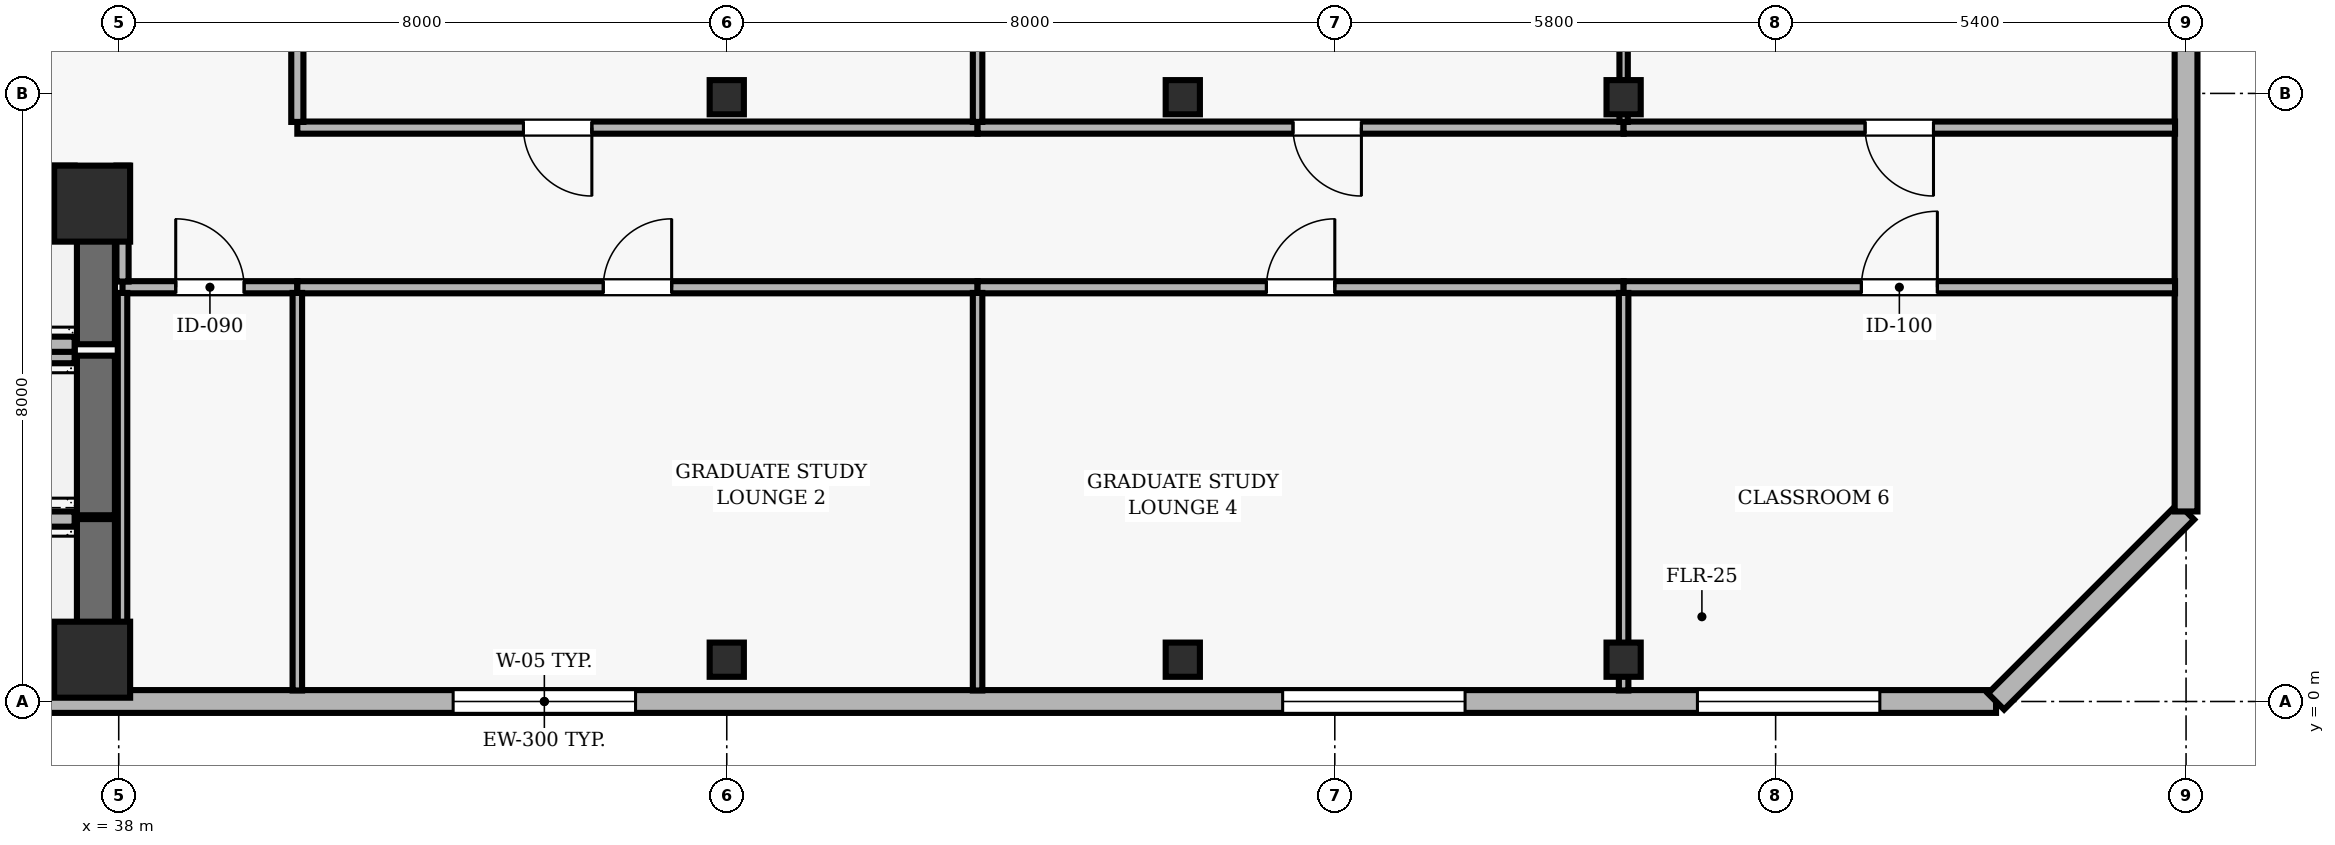
"""IFC4 building model, lengths in metres.
Left out: names, types, materials, properties, quantities, classifications, styles, units other than length and angle.
Written with IfcOpenShell. Run it as: python <this file> out.ifc"""

import sys

from ifc_helpers import new_model, si_unit, direction, frame, frame_2d, origin, origin_2d, place, context, subcontext, project, spatial, rectangle, hollow_rectangle, extrude, element, fill, save


model = new_model("IFC4")
c1 = context("Model", 3, precision=1e-05, world=origin(), true_north=direction((0.0, 1.0)))
c2 = subcontext(c1, "Body", "Model", "MODEL_VIEW")
j1 = project(units=[si_unit("LENGTHUNIT", "METRE"), si_unit("PLANEANGLEUNIT", "RADIAN")], contexts=[c1])
p1 = place(None, origin())
s1 = spatial("IfcSite", under=j1, at=p1, CompositionType="ELEMENT")
p2 = place(p1, origin())
s2 = spatial("IfcBuilding", under=s1, at=p2, CompositionType="ELEMENT")
p3 = place(p2, frame((0.0, 0.0, 214.8)))
s3 = spatial("IfcBuildingStorey", under=s2, at=p3, CompositionType="ELEMENT", Elevation=214.8)
for number, where, z_axis, x_axis in (
    (1, (37.65, 0.55, 0.0), (0.0, 0.0, 1.0), (1.0, 0.0, 0.0)),
    (2, (37.65, 6.55, 0.0), (0.0, 0.0, 1.0), (1.0, 0.0, 0.0)),
):
    element("IfcColumn", number, at=place(p3, frame(where, z_axis=z_axis, x_axis=x_axis)), inside=s3, PredefinedType="COLUMN", context=c2, shape_type="SweptSolid", body=[
        extrude(rectangle(XDim=1.0, YDim=1.0, at=origin_2d()), origin(), (0.0, 0.0, 1.0), 3.9),
    ])
for number, where, z_axis, x_axis in (
    (3, (46.0, 0.55, 0.0), (0.0, 0.0, 1.0), (1.0, 0.0, 0.0)),
    (4, (46.0, 7.95, 0.0), (0.0, 0.0, 1.0), (1.0, 0.0, 0.0)),
    (5, (52.0, 0.55, 0.0), (0.0, 0.0, 1.0), (1.0, 0.0, 0.0)),
    (6, (52.0, 7.95, 0.0), (0.0, 0.0, 1.0), (1.0, 0.0, 0.0)),
    (7, (57.8, 0.55, 0.0), (0.0, 0.0, 1.0), (1.0, 0.0, 0.0)),
    (8, (57.8, 7.95, 0.0), (0.0, 0.0, 1.0), (1.0, 0.0, 0.0)),
):
    element("IfcColumn", number, at=place(p3, frame(where, z_axis=z_axis, x_axis=x_axis)), inside=s3, PredefinedType="COLUMN", context=c2, shape_type="SweptSolid", body=[
        extrude(hollow_rectangle(XDim=0.45, YDim=0.45, WallThickness=0.02, at=origin_2d()), origin(), (0.0, 0.0, 1.0), 3.9),
    ])
p4 = place(p3, frame((24.5, 0.0, 0.0), z_axis=(0.0, 0.0, 1.0), x_axis=(1.0, 0.0, 0.0)))
e9 = element("IfcWall", 9, at=p4, inside=s3, PredefinedType="SOLIDWALL", context=c2, shape_type="SweptSolid", body=[
    extrude(rectangle(XDim=38.2, YDim=0.3, at=frame_2d((19.1, 0.0))), origin(), (0.0, 0.0, 1.0), 3.69),
])
p5 = place(p4, frame((1.529, 0.0, 0.9)))
e10 = element("IfcOpeningElement", 10, at=p5, cuts=e9, PredefinedType="OPENING", context=c2, shape_type="SweptSolid", body=[
    extrude(rectangle(XDim=2.4, YDim=1.6, at=frame_2d((1.2, 0.8))), frame((0.0, 0.16, 0.0), z_axis=(0.0, -1.0, 0.0), x_axis=(1.0, 0.0, 0.0)), (0.0, 0.0, 1.0), 0.32),
])
p6 = place(p4, frame((17.9, 0.0, 0.9)))
e11 = element("IfcOpeningElement", 11, at=p6, cuts=e9, PredefinedType="OPENING", context=c2, shape_type="SweptSolid", body=[
    extrude(rectangle(XDim=2.4, YDim=1.6, at=frame_2d((1.2, 0.8))), frame((0.0, 0.16, 0.0), z_axis=(0.0, -1.0, 0.0), x_axis=(1.0, 0.0, 0.0)), (0.0, 0.0, 1.0), 0.32),
])
p7 = place(p4, frame((28.814, 0.0, 0.9)))
e12 = element("IfcOpeningElement", 12, at=p7, cuts=e9, PredefinedType="OPENING", context=c2, shape_type="SweptSolid", body=[
    extrude(rectangle(XDim=2.4, YDim=1.6, at=frame_2d((1.2, 0.8))), frame((0.0, 0.16, 0.0), z_axis=(0.0, -1.0, 0.0), x_axis=(1.0, 0.0, 0.0)), (0.0, 0.0, 1.0), 0.32),
])
p8 = place(p4, frame((34.271, 0.0, 0.9)))
e13 = element("IfcOpeningElement", 13, at=p8, cuts=e9, PredefinedType="OPENING", context=c2, shape_type="SweptSolid", body=[
    extrude(rectangle(XDim=2.4, YDim=1.6, at=frame_2d((1.2, 0.8))), frame((0.0, 0.16, 0.0), z_axis=(0.0, -1.0, 0.0), x_axis=(1.0, 0.0, 0.0)), (0.0, 0.0, 1.0), 0.32),
])
p9 = place(p3, frame((62.7, 0.0, 0.0), z_axis=(0.0, 0.0, 1.0), x_axis=(0.707106781187, 0.707106781187, 0.0)))
e14 = element("IfcWall", 14, at=p9, inside=s3, PredefinedType="SOLIDWALL", context=c2, shape_type="SweptSolid", body=[
    extrude(rectangle(XDim=3.536, YDim=0.3, at=frame_2d((1.768, 0.0))), origin(), (0.0, 0.0, 1.0), 3.69),
])
p10 = place(p3, frame((65.2, 2.5, 0.0), z_axis=(0.0, 0.0, 1.0), x_axis=(0.0, 1.0, 0.0)))
e15 = element("IfcWall", 15, at=p10, inside=s3, PredefinedType="SOLIDWALL", context=c2, shape_type="SweptSolid", body=[
    extrude(rectangle(XDim=11.0, YDim=0.3, at=frame_2d((5.5, 0.0))), origin(), (0.0, 0.0, 1.0), 3.69),
])
p11 = place(p10, frame((7.35, 0.0, 0.9)))
e16 = element("IfcOpeningElement", 16, at=p11, cuts=e15, PredefinedType="OPENING", context=c2, shape_type="SweptSolid", body=[
    extrude(rectangle(XDim=1.8, YDim=1.8, at=frame_2d((0.9, 0.9))), frame((0.0, 0.16, 0.0), z_axis=(0.0, -1.0, 0.0), x_axis=(1.0, 0.0, 0.0)), (0.0, 0.0, 1.0), 0.32),
])
p12 = place(p3, frame((37.7, 0.3, 0.0), z_axis=(0.0, 0.0, 1.0), x_axis=(0.0, 1.0, 0.0)))
e17 = element("IfcWall", 17, at=p12, inside=s3, PredefinedType="SHEAR", context=c2, shape_type="SweptSolid", body=[
    extrude(rectangle(XDim=2.1, YDim=0.5, at=frame_2d((1.05, 0.0))), origin(), (0.0, 0.0, 1.0), 3.69),
])
for number, where, z_axis, x_axis in (
    (18, (35.28, 0.3, 0.0), (0.0, 0.0, 1.0), (1.0, 0.0, 0.0)),
    (19, (37.42, 2.4, 0.0), (0.0, 0.0, 1.0), (-1.0, 0.0, 0.0)),
):
    element("IfcWall", number, at=place(p3, frame(where, z_axis=z_axis, x_axis=x_axis)), inside=s3, PredefinedType="SOLIDWALL", context=c2, shape_type="SweptSolid", body=[
        extrude(rectangle(XDim=2.14, YDim=0.2, at=frame_2d((1.07, 0.0))), origin(), (0.0, 0.0, 1.0), 3.69),
    ])
p13 = place(p3, frame((37.7, 2.45, 0.0), z_axis=(0.0, 0.0, 1.0), x_axis=(0.0, 1.0, 0.0)))
e20 = element("IfcWall", 20, at=p13, inside=s3, PredefinedType="SHEAR", context=c2, shape_type="SweptSolid", body=[
    extrude(rectangle(XDim=2.1, YDim=0.5, at=frame_2d((1.05, 0.0))), origin(), (0.0, 0.0, 1.0), 3.69),
])
p14 = place(p3, frame((37.42, 4.55, 0.0), z_axis=(0.0, 0.0, 1.0), x_axis=(-1.0, 0.0, 0.0)))
e21 = element("IfcWall", 21, at=p14, inside=s3, PredefinedType="SOLIDWALL", context=c2, shape_type="SweptSolid", body=[
    extrude(rectangle(XDim=2.14, YDim=0.2, at=frame_2d((1.07, 0.0))), origin(), (0.0, 0.0, 1.0), 3.69),
])
p15 = place(p3, frame((37.7, 4.7, 0.0), z_axis=(0.0, 0.0, 1.0), x_axis=(0.0, 1.0, 0.0)))
e22 = element("IfcWall", 22, at=p15, inside=s3, PredefinedType="SHEAR", context=c2, shape_type="SweptSolid", body=[
    extrude(rectangle(XDim=2.25, YDim=0.5, at=frame_2d((1.125, 0.0))), origin(), (0.0, 0.0, 1.0), 3.69),
])
for number, where, z_axis, x_axis in (
    (23, (35.28, 4.7, 0.0), (0.0, 0.0, 1.0), (1.0, 0.0, 0.0)),
    (24, (37.42, 6.95, 0.0), (0.0, 0.0, 1.0), (-1.0, 0.0, 0.0)),
):
    element("IfcWall", number, at=place(p3, frame(where, z_axis=z_axis, x_axis=x_axis)), inside=s3, PredefinedType="SOLIDWALL", context=c2, shape_type="SweptSolid", body=[
        extrude(rectangle(XDim=2.14, YDim=0.2, at=frame_2d((1.07, 0.0))), origin(), (0.0, 0.0, 1.0), 3.69),
    ])
p16 = place(p3, frame((38.05, 5.45, 0.0), z_axis=(0.0, 0.0, 1.0), x_axis=(1.0, 0.0, 0.0)))
e25 = element("IfcWall", 25, at=p16, inside=s3, PredefinedType="PARTITIONING", context=c2, shape_type="SweptSolid", body=[
    extrude(rectangle(XDim=2.3, YDim=0.16, at=frame_2d((1.15, 0.0))), origin(), (0.0, 0.0, 1.0), 3.343),
])
p17 = place(p16, frame((0.7, 0.0, 0.0)))
e26 = element("IfcOpeningElement", 26, at=p17, cuts=e25, PredefinedType="OPENING", context=c2, shape_type="SweptSolid", body=[
    extrude(rectangle(XDim=0.9, YDim=2.1, at=frame_2d((0.45, 1.05))), frame((0.0, 0.09, 0.0), z_axis=(0.0, -1.0, 0.0), x_axis=(1.0, 0.0, 0.0)), (0.0, 0.0, 1.0), 0.18),
])
p18 = place(p3, frame((40.35, 5.45, 0.0), z_axis=(0.0, 0.0, 1.0), x_axis=(1.0, 0.0, 0.0)))
e27 = element("IfcWall", 27, at=p18, inside=s3, PredefinedType="PARTITIONING", context=c2, shape_type="SweptSolid", body=[
    extrude(rectangle(XDim=8.95, YDim=0.16, at=frame_2d((4.475, 0.0))), origin(), (0.0, 0.0, 1.0), 3.343),
])
p19 = place(p18, frame((4.025, 0.0, 0.0)))
e28 = element("IfcOpeningElement", 28, at=p19, cuts=e27, PredefinedType="OPENING", context=c2, shape_type="SweptSolid", body=[
    extrude(rectangle(XDim=0.9, YDim=2.1, at=frame_2d((0.45, 1.05))), frame((0.0, 0.09, 0.0), z_axis=(0.0, -1.0, 0.0), x_axis=(1.0, 0.0, 0.0)), (0.0, 0.0, 1.0), 0.18),
])
p20 = place(p3, frame((49.3, 5.45, 0.0), z_axis=(0.0, 0.0, 1.0), x_axis=(1.0, 0.0, 0.0)))
e29 = element("IfcWall", 29, at=p20, inside=s3, PredefinedType="PARTITIONING", context=c2, shape_type="SweptSolid", body=[
    extrude(rectangle(XDim=8.5, YDim=0.16, at=frame_2d((4.25, 0.0))), origin(), (0.0, 0.0, 1.0), 3.343),
])
p21 = place(p20, frame((3.8, 0.0, 0.0)))
e30 = element("IfcOpeningElement", 30, at=p21, cuts=e29, PredefinedType="OPENING", context=c2, shape_type="SweptSolid", body=[
    extrude(rectangle(XDim=0.9, YDim=2.1, at=frame_2d((0.45, 1.05))), frame((0.0, 0.09, 0.0), z_axis=(0.0, -1.0, 0.0), x_axis=(1.0, 0.0, 0.0)), (0.0, 0.0, 1.0), 0.18),
])
p22 = place(p3, frame((49.3, 7.55, 0.0), z_axis=(0.0, 0.0, 1.0), x_axis=(-1.0, 0.0, 0.0)))
e31 = element("IfcWall", 31, at=p22, inside=s3, PredefinedType="PARTITIONING", context=c2, shape_type="SweptSolid", body=[
    extrude(rectangle(XDim=8.95, YDim=0.16, at=frame_2d((4.475, 0.0))), origin(), (0.0, 0.0, 1.0), 3.139),
])
p23 = place(p22, frame((5.075, 0.0, 0.0)))
e32 = element("IfcOpeningElement", 32, at=p23, cuts=e31, PredefinedType="OPENING", context=c2, shape_type="SweptSolid", body=[
    extrude(rectangle(XDim=0.9, YDim=2.1, at=frame_2d((0.45, 1.05))), frame((0.0, 0.09, 0.0), z_axis=(0.0, -1.0, 0.0), x_axis=(1.0, 0.0, 0.0)), (0.0, 0.0, 1.0), 0.18),
])
p24 = place(p3, frame((57.8, 5.45, 0.0), z_axis=(0.0, 0.0, 1.0), x_axis=(1.0, 0.0, 0.0)))
e33 = element("IfcWall", 33, at=p24, inside=s3, PredefinedType="PARTITIONING", context=c2, shape_type="SweptSolid", body=[
    extrude(rectangle(XDim=7.255, YDim=0.16, at=frame_2d((3.627, 0.0))), origin(), (0.0, 0.0, 1.0), 3.69),
])
p25 = place(p24, frame((3.128, 0.0, 0.0)))
e34 = element("IfcOpeningElement", 34, at=p25, cuts=e33, PredefinedType="OPENING", context=c2, shape_type="SweptSolid", body=[
    extrude(rectangle(XDim=1.0, YDim=2.1, at=frame_2d((0.5, 1.05))), frame((0.0, 0.09, 0.0), z_axis=(0.0, -1.0, 0.0), x_axis=(1.0, 0.0, 0.0)), (0.0, 0.0, 1.0), 0.18),
])
p26 = place(p3, frame((57.8, 7.55, 0.0), z_axis=(0.0, 0.0, 1.0), x_axis=(-1.0, 0.0, 0.0)))
e35 = element("IfcWall", 35, at=p26, inside=s3, PredefinedType="PARTITIONING", context=c2, shape_type="SweptSolid", body=[
    extrude(rectangle(XDim=8.5, YDim=0.16, at=frame_2d((4.25, 0.0))), origin(), (0.0, 0.0, 1.0), 3.139),
])
p27 = place(p26, frame((3.45, 0.0, 0.0)))
e36 = element("IfcOpeningElement", 36, at=p27, cuts=e35, PredefinedType="OPENING", context=c2, shape_type="SweptSolid", body=[
    extrude(rectangle(XDim=0.9, YDim=2.1, at=frame_2d((0.45, 1.05))), frame((0.0, 0.09, 0.0), z_axis=(0.0, -1.0, 0.0), x_axis=(1.0, 0.0, 0.0)), (0.0, 0.0, 1.0), 0.18),
])
p28 = place(p3, frame((65.055, 7.55, 0.0), z_axis=(0.0, 0.0, 1.0), x_axis=(-1.0, 0.0, 0.0)))
e37 = element("IfcWall", 37, at=p28, inside=s3, PredefinedType="PARTITIONING", context=c2, shape_type="SweptSolid", body=[
    extrude(rectangle(XDim=7.255, YDim=0.16, at=frame_2d((3.627, 0.0))), origin(), (0.0, 0.0, 1.0), 3.69),
])
p29 = place(p28, frame((3.178, 0.0, 0.0)))
e38 = element("IfcOpeningElement", 38, at=p29, cuts=e37, PredefinedType="OPENING", context=c2, shape_type="SweptSolid", body=[
    extrude(rectangle(XDim=0.9, YDim=2.1, at=frame_2d((0.45, 1.05))), frame((0.0, 0.09, 0.0), z_axis=(0.0, -1.0, 0.0), x_axis=(1.0, 0.0, 0.0)), (0.0, 0.0, 1.0), 0.18),
])
p30 = place(p3, frame((38.05, 5.375, 0.0), z_axis=(0.0, 0.0, 1.0), x_axis=(0.0, -1.0, 0.0)))
e39 = element("IfcWall", 39, at=p30, inside=s3, PredefinedType="PARTITIONING", context=c2, shape_type="SweptSolid", body=[
    extrude(rectangle(XDim=5.23, YDim=0.125, at=frame_2d((2.615, 0.0))), origin(), (0.0, 0.0, 1.0), 3.139),
])
p31 = place(p3, frame((38.05, 7.05, 0.0), z_axis=(0.0, 0.0, 1.0), x_axis=(0.0, -1.0, 0.0)))
e40 = element("IfcWall", 40, at=p31, inside=s3, PredefinedType="PARTITIONING", context=c2, shape_type="SweptSolid", body=[
    extrude(rectangle(XDim=1.525, YDim=0.16, at=frame_2d((0.763, 0.0))), origin(), (0.0, 0.0, 1.0), 3.139),
])
p32 = place(p3, frame((40.35, 0.145, 0.0), z_axis=(0.0, 0.0, 1.0), x_axis=(0.0, 1.0, 0.0)))
e41 = element("IfcWall", 41, at=p32, inside=s3, PredefinedType="PARTITIONING", context=c2, shape_type="SweptSolid", body=[
    extrude(rectangle(XDim=5.23, YDim=0.125, at=frame_2d((2.615, 0.0))), origin(), (0.0, 0.0, 1.0), 3.69),
])
p33 = place(p3, frame((40.35, 7.625, 0.0), z_axis=(0.0, 0.0, 1.0), x_axis=(0.0, 1.0, 0.0)))
e42 = element("IfcWall", 42, at=p33, inside=s3, PredefinedType="PARTITIONING", context=c2, shape_type="SweptSolid", body=[
    extrude(rectangle(XDim=8.3, YDim=0.16, at=frame_2d((4.15, 0.0))), origin(), (0.0, 0.0, 1.0), 3.69),
])
p34 = place(p3, frame((49.3, 0.145, 0.0), z_axis=(0.0, 0.0, 1.0), x_axis=(0.0, 1.0, 0.0)))
e43 = element("IfcWall", 43, at=p34, inside=s3, PredefinedType="PARTITIONING", context=c2, shape_type="SweptSolid", body=[
    extrude(rectangle(XDim=5.23, YDim=0.125, at=frame_2d((2.615, 0.0))), origin(), (0.0, 0.0, 1.0), 3.69),
])
p35 = place(p3, frame((49.3, 7.625, 0.0), z_axis=(0.0, 0.0, 1.0), x_axis=(0.0, 1.0, 0.0)))
e44 = element("IfcWall", 44, at=p35, inside=s3, PredefinedType="PARTITIONING", context=c2, shape_type="SweptSolid", body=[
    extrude(rectangle(XDim=8.23, YDim=0.125, at=frame_2d((4.115, 0.0))), origin(), (0.0, 0.0, 1.0), 3.69),
])
p36 = place(p3, frame((57.8, 0.145, 0.0), z_axis=(0.0, 0.0, 1.0), x_axis=(0.0, 1.0, 0.0)))
e45 = element("IfcWall", 45, at=p36, inside=s3, PredefinedType="PARTITIONING", context=c2, shape_type="SweptSolid", body=[
    extrude(rectangle(XDim=5.23, YDim=0.125, at=frame_2d((2.615, 0.0))), origin(), (0.0, 0.0, 1.0), 3.139),
])
p37 = place(p3, frame((57.8, 7.625, 0.0), z_axis=(0.0, 0.0, 1.0), x_axis=(0.0, 1.0, 0.0)))
e46 = element("IfcWall", 46, at=p37, inside=s3, PredefinedType="MOVABLE", context=c2, shape_type="SweptSolid", body=[
    extrude(rectangle(XDim=8.23, YDim=0.11, at=frame_2d((4.115, 0.0))), origin(), (0.0, 0.0, 1.0), 3.139),
])
p38 = place(p6, origin())
e47 = element("IfcWindow", 47, at=p38, inside=s3, PartitioningType="SINGLE_PANEL", PredefinedType="WINDOW", context=c2, shape_type="SweptSolid", body=[
    extrude(rectangle(XDim=2.4, YDim=1.6, at=frame_2d((1.2, 0.8))), frame((0.0, 0.03, 0.0), z_axis=(0.0, -1.0, 0.0), x_axis=(1.0, 0.0, 0.0)), (0.0, 0.0, 1.0), 0.06),
])
fill(e11, e47)
p39 = place(p7, origin())
e48 = element("IfcWindow", 48, at=p39, inside=s3, PartitioningType="SINGLE_PANEL", PredefinedType="WINDOW", context=c2, shape_type="SweptSolid", body=[
    extrude(rectangle(XDim=2.4, YDim=1.6, at=frame_2d((1.2, 0.8))), frame((0.0, 0.03, 0.0), z_axis=(0.0, -1.0, 0.0), x_axis=(1.0, 0.0, 0.0)), (0.0, 0.0, 1.0), 0.06),
])
fill(e12, e48)
p40 = place(p8, origin())
e49 = element("IfcWindow", 49, at=p40, inside=s3, PartitioningType="SINGLE_PANEL", PredefinedType="WINDOW", context=c2, shape_type="SweptSolid", body=[
    extrude(rectangle(XDim=2.4, YDim=1.6, at=frame_2d((1.2, 0.8))), frame((0.0, 0.03, 0.0), z_axis=(0.0, -1.0, 0.0), x_axis=(1.0, 0.0, 0.0)), (0.0, 0.0, 1.0), 0.06),
])
fill(e13, e49)
p41 = place(p17, origin())
e50 = element("IfcDoor", 50, at=p41, inside=s3, OperationType="SINGLE_SWING_LEFT", PredefinedType="DOOR", context=c2, shape_type="SweptSolid", body=[
    extrude(rectangle(XDim=0.9, YDim=2.1, at=frame_2d((0.45, 1.05))), frame((0.0, 0.025, 0.0), z_axis=(0.0, -1.0, 0.0), x_axis=(1.0, 0.0, 0.0)), (0.0, 0.0, 1.0), 0.05),
])
fill(e26, e50)
p42 = place(p19, origin())
e51 = element("IfcDoor", 51, at=p42, inside=s3, OperationType="SINGLE_SWING_RIGHT", PredefinedType="DOOR", context=c2, shape_type="SweptSolid", body=[
    extrude(rectangle(XDim=0.9, YDim=2.1, at=frame_2d((0.45, 1.05))), frame((0.0, 0.025, 0.0), z_axis=(0.0, -1.0, 0.0), x_axis=(1.0, 0.0, 0.0)), (0.0, 0.0, 1.0), 0.05),
])
fill(e28, e51)
p43 = place(p23, origin())
e52 = element("IfcDoor", 52, at=p43, inside=s3, OperationType="SINGLE_SWING_LEFT", PredefinedType="DOOR", context=c2, shape_type="SweptSolid", body=[
    extrude(rectangle(XDim=0.9, YDim=2.1, at=frame_2d((0.45, 1.05))), frame((0.0, 0.025, 0.0), z_axis=(0.0, -1.0, 0.0), x_axis=(1.0, 0.0, 0.0)), (0.0, 0.0, 1.0), 0.05),
])
fill(e32, e52)
p44 = place(p21, origin())
e53 = element("IfcDoor", 53, at=p44, inside=s3, OperationType="SINGLE_SWING_RIGHT", PredefinedType="DOOR", context=c2, shape_type="SweptSolid", body=[
    extrude(rectangle(XDim=0.9, YDim=2.1, at=frame_2d((0.45, 1.05))), frame((0.0, 0.025, 0.0), z_axis=(0.0, -1.0, 0.0), x_axis=(1.0, 0.0, 0.0)), (0.0, 0.0, 1.0), 0.05),
])
fill(e30, e53)
p45 = place(p27, origin())
e54 = element("IfcDoor", 54, at=p45, inside=s3, OperationType="SINGLE_SWING_LEFT", PredefinedType="DOOR", context=c2, shape_type="SweptSolid", body=[
    extrude(rectangle(XDim=0.9, YDim=2.1, at=frame_2d((0.45, 1.05))), frame((0.0, 0.025, 0.0), z_axis=(0.0, -1.0, 0.0), x_axis=(1.0, 0.0, 0.0)), (0.0, 0.0, 1.0), 0.05),
])
fill(e36, e54)
p46 = place(p25, origin())
e55 = element("IfcDoor", 55, at=p46, inside=s3, OperationType="SINGLE_SWING_RIGHT", PredefinedType="DOOR", context=c2, shape_type="SweptSolid", body=[
    extrude(rectangle(XDim=1.0, YDim=2.1, at=frame_2d((0.5, 1.05))), frame((0.0, 0.025, 0.0), z_axis=(0.0, -1.0, 0.0), x_axis=(1.0, 0.0, 0.0)), (0.0, 0.0, 1.0), 0.05),
])
fill(e34, e55)
p47 = place(p29, origin())
e56 = element("IfcDoor", 56, at=p47, inside=s3, OperationType="SINGLE_SWING_LEFT", PredefinedType="DOOR", context=c2, shape_type="SweptSolid", body=[
    extrude(rectangle(XDim=0.9, YDim=2.1, at=frame_2d((0.45, 1.05))), frame((0.0, 0.025, 0.0), z_axis=(0.0, -1.0, 0.0), x_axis=(1.0, 0.0, 0.0)), (0.0, 0.0, 1.0), 0.05),
])
fill(e38, e56)
save(model, sys.argv[1])
